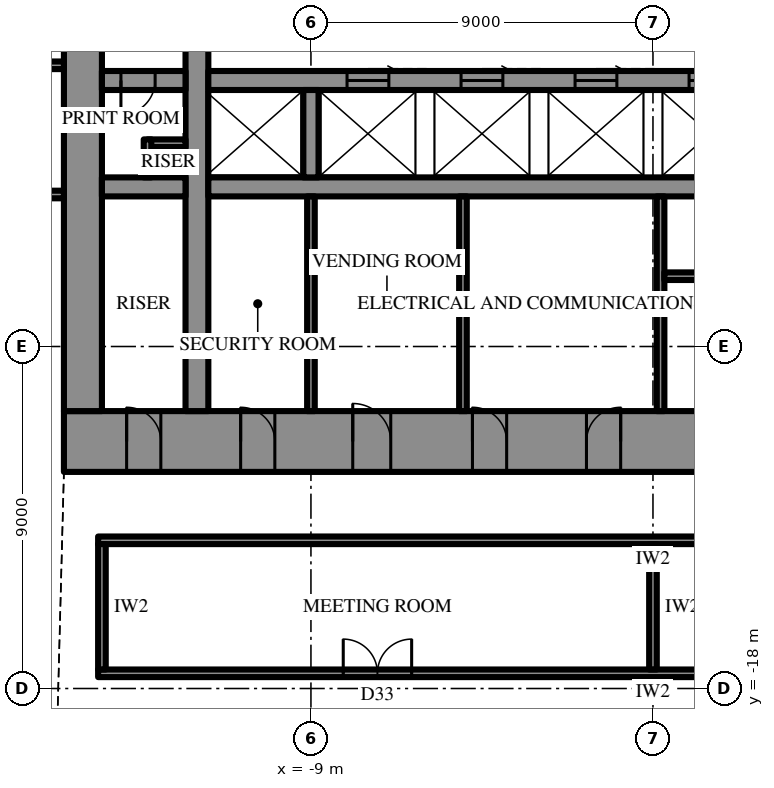
"""IFC4 building model, lengths in metres.
Left out: names, types, materials, properties, quantities, classifications, styles, units other than length and angle.
Written with IfcOpenShell. Run it as: python <this file> out.ifc"""

import sys

from ifc_helpers import new_model, si_unit, direction, frame, frame_2d, origin, place, context, subcontext, project, spatial, rectangle, extrude, element, fill, save


model = new_model("IFC4")
c1 = context("Model", 3, precision=1e-05, world=origin(), true_north=direction((0.0, 1.0)))
c2 = subcontext(c1, "Body", "Model", "MODEL_VIEW")
j1 = project(units=[si_unit("LENGTHUNIT", "METRE"), si_unit("PLANEANGLEUNIT", "RADIAN")], contexts=[c1])
p1 = place(None, origin())
s1 = spatial("IfcSite", under=j1, at=p1, CompositionType="ELEMENT")
p2 = place(p1, origin())
s2 = spatial("IfcBuilding", under=s1, at=p2, CompositionType="ELEMENT")
p3 = place(p2, frame((0.0, 0.0, 282.7)))
s3 = spatial("IfcBuildingStorey", under=s2, at=p3, CompositionType="ELEMENT", Elevation=282.7)
p4 = place(p3, frame((15.5, -11.5, 0.0), z_axis=(0.0, 0.0, 1.0), x_axis=(-1.0, 0.0, 0.0)))
e1 = element("IfcWall", 1, at=p4, inside=s3, PredefinedType="SHEAR", context=c2, shape_type="SweptSolid", body=[
    extrude(rectangle(XDim=31.0, YDim=1.6, at=frame_2d((15.5, 0.0))), origin(), (0.0, 0.0, 1.0), 4.2),
])
p5 = place(p4, frame((16.35, 0.0, 0.0)))
e2 = element("IfcOpeningElement", 2, at=p5, cuts=e1, PredefinedType="OPENING", context=c2, shape_type="SweptSolid", body=[
    extrude(rectangle(XDim=0.9, YDim=2.2, at=frame_2d((0.45, 1.1))), frame((0.0, 0.81, 0.0), z_axis=(0.0, -1.0, 0.0), x_axis=(1.0, 0.0, 0.0)), (0.0, 0.0, 1.0), 1.62),
])
p6 = place(p4, frame((19.35, 0.0, 0.0)))
e3 = element("IfcOpeningElement", 3, at=p6, cuts=e1, PredefinedType="OPENING", context=c2, shape_type="SweptSolid", body=[
    extrude(rectangle(XDim=0.9, YDim=2.2, at=frame_2d((0.45, 1.1))), frame((0.0, 0.81, 0.0), z_axis=(0.0, -1.0, 0.0), x_axis=(1.0, 0.0, 0.0)), (0.0, 0.0, 1.0), 1.62),
])
p7 = place(p4, frame((22.4, 0.0, 0.0)))
e4 = element("IfcOpeningElement", 4, at=p7, cuts=e1, PredefinedType="OPENING", context=c2, shape_type="SweptSolid", body=[
    extrude(rectangle(XDim=1.0, YDim=2.2, at=frame_2d((0.5, 1.1))), frame((0.0, 0.81, 0.0), z_axis=(0.0, -1.0, 0.0), x_axis=(1.0, 0.0, 0.0)), (0.0, 0.0, 1.0), 1.62),
])
p8 = place(p4, frame((1.65, 0.0, 0.0)))
e5 = element("IfcOpeningElement", 5, at=p8, cuts=e1, PredefinedType="OPENING", context=c2, shape_type="SweptSolid", body=[
    extrude(rectangle(XDim=0.9, YDim=2.2, at=frame_2d((0.45, 1.1))), frame((0.0, 0.81, 0.0), z_axis=(0.0, -1.0, 0.0), x_axis=(1.0, 0.0, 0.0)), (0.0, 0.0, 1.0), 1.62),
])
p9 = place(p4, frame((4.65, 0.0, 0.0)))
e6 = element("IfcOpeningElement", 6, at=p9, cuts=e1, PredefinedType="OPENING", context=c2, shape_type="SweptSolid", body=[
    extrude(rectangle(XDim=0.9, YDim=2.2, at=frame_2d((0.45, 1.1))), frame((0.0, 0.81, 0.0), z_axis=(0.0, -1.0, 0.0), x_axis=(1.0, 0.0, 0.0)), (0.0, 0.0, 1.0), 1.62),
])
p10 = place(p4, frame((25.45, 0.0, 0.0)))
e7 = element("IfcOpeningElement", 7, at=p10, cuts=e1, PredefinedType="OPENING", context=c2, shape_type="SweptSolid", body=[
    extrude(rectangle(XDim=0.9, YDim=2.2, at=frame_2d((0.45, 1.1))), frame((0.0, 0.81, 0.0), z_axis=(0.0, -1.0, 0.0), x_axis=(1.0, 0.0, 0.0)), (0.0, 0.0, 1.0), 1.62),
])
p11 = place(p4, frame((28.45, 0.0, 0.0)))
e8 = element("IfcOpeningElement", 8, at=p11, cuts=e1, PredefinedType="OPENING", context=c2, shape_type="SweptSolid", body=[
    extrude(rectangle(XDim=0.9, YDim=2.2, at=frame_2d((0.45, 1.1))), frame((0.0, 0.81, 0.0), z_axis=(0.0, -1.0, 0.0), x_axis=(1.0, 0.0, 0.0)), (0.0, 0.0, 1.0), 1.62),
])
p12 = place(p3, frame((-15.0, 10.7, 0.0), z_axis=(0.0, 0.0, 1.0), x_axis=(0.0, -1.0, 0.0)))
e9 = element("IfcWall", 9, at=p12, inside=s3, PredefinedType="SHEAR", context=c2, shape_type="SweptSolid", body=[
    extrude(rectangle(XDim=21.4, YDim=1.0, at=frame_2d((10.7, 0.0))), origin(), (0.0, 0.0, 1.0), 4.2),
])
p13 = place(p12, frame((9.8, 0.0, 0.0)))
e10 = element("IfcOpeningElement", 10, at=p13, cuts=e9, PredefinedType="OPENING", context=c2, shape_type="SweptSolid", body=[
    extrude(rectangle(XDim=1.8, YDim=2.4, at=frame_2d((0.9, 1.2))), frame((0.0, 0.51, 0.0), z_axis=(0.0, -1.0, 0.0), x_axis=(1.0, 0.0, 0.0)), (0.0, 0.0, 1.0), 1.02),
])
p14 = place(p3, frame((-12.0, -10.7, 0.0), z_axis=(0.0, 0.0, 1.0), x_axis=(0.0, 1.0, 0.0)))
e11 = element("IfcWall", 11, at=p14, inside=s3, PredefinedType="SHEAR", context=c2, shape_type="SweptSolid", body=[
    extrude(rectangle(XDim=21.4, YDim=0.6, at=frame_2d((10.7, 0.0))), origin(), (0.0, 0.0, 1.0), 4.2),
])
p15 = place(p14, frame((9.8, 0.0, 0.0)))
e12 = element("IfcOpeningElement", 12, at=p15, cuts=e11, PredefinedType="OPENING", context=c2, shape_type="SweptSolid", body=[
    extrude(rectangle(XDim=1.8, YDim=2.4, at=frame_2d((0.9, 1.2))), frame((0.0, 0.31, 0.0), z_axis=(0.0, -1.0, 0.0), x_axis=(1.0, 0.0, 0.0)), (0.0, 0.0, 1.0), 0.62),
])
p16 = place(p3, frame((3.2, -2.0, 0.0), z_axis=(0.0, 0.0, 1.0), x_axis=(-1.0, 0.0, 0.0)))
e13 = element("IfcWall", 13, at=p16, inside=s3, PredefinedType="SHEAR", context=c2, shape_type="SweptSolid", body=[
    extrude(rectangle(XDim=14.9, YDim=0.5, at=frame_2d((7.45, 0.0))), origin(), (0.0, 0.0, 1.0), 4.2),
])
p17 = place(p16, frame((1.15, 0.0, 0.0)))
e14 = element("IfcOpeningElement", 14, at=p17, cuts=e13, PredefinedType="OPENING", context=c2, shape_type="SweptSolid", body=[
    extrude(rectangle(XDim=1.1, YDim=2.2, at=frame_2d((0.55, 1.1))), frame((0.0, 0.26, 0.0), z_axis=(0.0, -1.0, 0.0), x_axis=(1.0, 0.0, 0.0)), (0.0, 0.0, 1.0), 0.52),
])
p18 = place(p16, frame((4.15, 0.0, 0.0)))
e15 = element("IfcOpeningElement", 15, at=p18, cuts=e13, PredefinedType="OPENING", context=c2, shape_type="SweptSolid", body=[
    extrude(rectangle(XDim=1.1, YDim=2.2, at=frame_2d((0.55, 1.1))), frame((0.0, 0.26, 0.0), z_axis=(0.0, -1.0, 0.0), x_axis=(1.0, 0.0, 0.0)), (0.0, 0.0, 1.0), 0.52),
])
p19 = place(p16, frame((7.15, 0.0, 0.0)))
e16 = element("IfcOpeningElement", 16, at=p19, cuts=e13, PredefinedType="OPENING", context=c2, shape_type="SweptSolid", body=[
    extrude(rectangle(XDim=1.1, YDim=2.2, at=frame_2d((0.55, 1.1))), frame((0.0, 0.26, 0.0), z_axis=(0.0, -1.0, 0.0), x_axis=(1.0, 0.0, 0.0)), (0.0, 0.0, 1.0), 0.52),
])
p20 = place(p16, frame((10.15, 0.0, 0.0)))
e17 = element("IfcOpeningElement", 17, at=p20, cuts=e13, PredefinedType="OPENING", context=c2, shape_type="SweptSolid", body=[
    extrude(rectangle(XDim=1.1, YDim=2.2, at=frame_2d((0.55, 1.1))), frame((0.0, 0.26, 0.0), z_axis=(0.0, -1.0, 0.0), x_axis=(1.0, 0.0, 0.0)), (0.0, 0.0, 1.0), 0.52),
])
p21 = place(p3, frame((-12.3, -2.0, 0.0), z_axis=(0.0, 0.0, 1.0), x_axis=(-1.0, 0.0, 0.0)))
e18 = element("IfcWall", 18, at=p21, inside=s3, PredefinedType="SHEAR", context=c2, shape_type="SweptSolid", body=[
    extrude(rectangle(XDim=2.2, YDim=0.5, at=frame_2d((1.1, 0.0))), origin(), (0.0, 0.0, 1.0), 4.2),
])
p22 = place(p21, frame((0.8, 0.0, 0.0)))
e19 = element("IfcOpeningElement", 19, at=p22, cuts=e18, PredefinedType="OPENING", context=c2, shape_type="SweptSolid", body=[
    extrude(rectangle(XDim=0.9, YDim=2.2, at=frame_2d((0.45, 1.1))), frame((0.0, 0.26, 0.0), z_axis=(0.0, -1.0, 0.0), x_axis=(1.0, 0.0, 0.0)), (0.0, 0.0, 1.0), 0.52),
])
p23 = place(p3, frame((11.7, -4.8, 0.0), z_axis=(0.0, 0.0, 1.0), x_axis=(-1.0, 0.0, 0.0)))
e20 = element("IfcWall", 20, at=p23, inside=s3, PredefinedType="SHEAR", context=c2, shape_type="SweptSolid", body=[
    extrude(rectangle(XDim=23.4, YDim=0.5, at=frame_2d((11.7, 0.0))), origin(), (0.0, 0.0, 1.0), 4.2),
])
p24 = place(p23, frame((6.6, 0.0, 0.0)))
e21 = element("IfcOpeningElement", 21, at=p24, cuts=e20, PredefinedType="OPENING", context=c2, shape_type="SweptSolid", body=[
    extrude(rectangle(XDim=1.2, YDim=2.2, at=frame_2d((0.6, 1.1))), frame((0.0, 0.26, 0.0), z_axis=(0.0, -1.0, 0.0), x_axis=(1.0, 0.0, 0.0)), (0.0, 0.0, 1.0), 0.52),
])
p25 = place(p23, frame((3.6, 0.0, 0.0)))
e22 = element("IfcOpeningElement", 22, at=p25, cuts=e20, PredefinedType="OPENING", context=c2, shape_type="SweptSolid", body=[
    extrude(rectangle(XDim=1.2, YDim=2.2, at=frame_2d((0.6, 1.1))), frame((0.0, 0.26, 0.0), z_axis=(0.0, -1.0, 0.0), x_axis=(1.0, 0.0, 0.0)), (0.0, 0.0, 1.0), 0.52),
])
p26 = place(p3, frame((-12.3, -4.8, 0.0), z_axis=(0.0, 0.0, 1.0), x_axis=(-1.0, 0.0, 0.0)))
e23 = element("IfcWall", 23, at=p26, inside=s3, PredefinedType="SHEAR", context=c2, shape_type="SweptSolid", body=[
    extrude(rectangle(XDim=2.2, YDim=0.5, at=frame_2d((1.1, 0.0))), origin(), (0.0, 0.0, 1.0), 4.2),
])
p27 = place(p3, frame((-9.0, -2.25, 0.0), z_axis=(0.0, 0.0, 1.0), x_axis=(0.0, -1.0, 0.0)))
e24 = element("IfcWall", 24, at=p27, inside=s3, PredefinedType="SHEAR", context=c2, shape_type="SweptSolid", body=[
    extrude(rectangle(XDim=2.3, YDim=0.4, at=frame_2d((1.15, 0.0))), origin(), (0.0, 0.0, 1.0), 4.2),
])
p28 = place(p3, frame((0.2, -5.05, 0.0), z_axis=(0.0, 0.0, 1.0), x_axis=(0.0, -1.0, 0.0)))
e25 = element("IfcWall", 25, at=p28, inside=s3, PredefinedType="SHEAR", context=c2, shape_type="SweptSolid", body=[
    extrude(rectangle(XDim=5.65, YDim=0.2, at=frame_2d((2.825, 0.0))), origin(), (0.0, 0.0, 1.0), 4.2),
])
p29 = place(p3, frame((8.9, -7.15, 0.0), z_axis=(0.0, 0.0, 1.0), x_axis=(-1.0, 0.0, 0.0)))
e26 = element("IfcWall", 26, at=p29, inside=s3, PredefinedType="SHEAR", context=c2, shape_type="SweptSolid", body=[
    extrude(rectangle(XDim=8.6, YDim=0.2, at=frame_2d((4.3, 0.0))), origin(), (0.0, 0.0, 1.0), 4.2),
])
p30 = place(p29, frame((0.3, 0.0, 0.0)))
e27 = element("IfcOpeningElement", 27, at=p30, cuts=e26, PredefinedType="OPENING", context=c2, shape_type="SweptSolid", body=[
    extrude(rectangle(XDim=1.0, YDim=2.2, at=frame_2d((0.5, 1.1))), frame((0.0, 0.11, 0.0), z_axis=(0.0, -1.0, 0.0), x_axis=(1.0, 0.0, 0.0)), (0.0, 0.0, 1.0), 0.22),
])
for number, where, z_axis, x_axis in (
    (28, (-9.0, -5.05, 0.0), (0.0, 0.0, 1.0), (0.0, -1.0, 0.0)),
    (29, (-5.0, -5.05, 0.0), (0.0, 0.0, 1.0), (0.0, -1.0, 0.0)),
):
    element("IfcWall", number, at=place(p3, frame(where, z_axis=z_axis, x_axis=x_axis)), inside=s3, PredefinedType="PARTITIONING", context=c2, shape_type="SweptSolid", body=[
        extrude(rectangle(XDim=5.65, YDim=0.2, at=frame_2d((2.825, 0.0))), origin(), (0.0, 0.0, 1.0), 4.0),
    ])
for number, where, z_axis, x_axis in (
    (30, (-12.3, -3.65, 0.0), (0.0, 0.0, 1.0), (-1.0, 0.0, 0.0)),
    (31, (-13.3, -3.55, 0.0), (0.0, 0.0, 1.0), (0.0, -1.0, 0.0)),
):
    element("IfcWall", number, at=place(p3, frame(where, z_axis=z_axis, x_axis=x_axis)), inside=s3, PredefinedType="PARTITIONING", context=c2, shape_type="SweptSolid", body=[
        extrude(rectangle(XDim=1.0, YDim=0.2, at=frame_2d((0.5, 0.0))), origin(), (0.0, 0.0, 1.0), 4.0),
    ])
p31 = place(p3, frame((14.6, -14.1, 0.0), z_axis=(0.0, 0.0, 1.0), x_axis=(-1.0, 0.0, 0.0)))
e32 = element("IfcWall", 32, at=p31, inside=s3, PredefinedType="PARTITIONING", context=c2, shape_type="SweptSolid", body=[
    extrude(rectangle(XDim=29.2, YDim=0.2, at=frame_2d((14.6, 0.0))), origin(), (0.0, 0.0, 1.0), 4.0),
])
p32 = place(p3, frame((14.6, -17.6, 0.0), z_axis=(0.0, 0.0, 1.0), x_axis=(-1.0, 0.0, 0.0)))
e33 = element("IfcWall", 33, at=p32, inside=s3, PredefinedType="PARTITIONING", context=c2, shape_type="SweptSolid", body=[
    extrude(rectangle(XDim=29.2, YDim=0.2, at=frame_2d((14.6, 0.0))), origin(), (0.0, 0.0, 1.0), 4.0),
])
p33 = place(p32, frame((6.45, 0.0, 0.0)))
e34 = element("IfcOpeningElement", 34, at=p33, cuts=e33, PredefinedType="OPENING", context=c2, shape_type="SweptSolid", body=[
    extrude(rectangle(XDim=1.8, YDim=2.4, at=frame_2d((0.9, 1.2))), frame((0.0, 0.11, 0.0), z_axis=(0.0, -1.0, 0.0), x_axis=(1.0, 0.0, 0.0)), (0.0, 0.0, 1.0), 0.22),
])
p34 = place(p32, frame((20.95, 0.0, 0.0)))
e35 = element("IfcOpeningElement", 35, at=p34, cuts=e33, PredefinedType="OPENING", context=c2, shape_type="SweptSolid", body=[
    extrude(rectangle(XDim=1.8, YDim=2.4, at=frame_2d((0.9, 1.2))), frame((0.0, 0.11, 0.0), z_axis=(0.0, -1.0, 0.0), x_axis=(1.0, 0.0, 0.0)), (0.0, 0.0, 1.0), 0.22),
])
p35 = place(p3, frame((0.0, -14.2, 0.0), z_axis=(0.0, 0.0, 1.0), x_axis=(0.0, -1.0, 0.0)))
e36 = element("IfcWall", 36, at=p35, inside=s3, PredefinedType="PARTITIONING", context=c2, shape_type="SweptSolid", body=[
    extrude(rectangle(XDim=3.3, YDim=0.2, at=frame_2d((1.65, 0.0))), origin(), (0.0, 0.0, 1.0), 2.992),
])
p36 = place(p3, frame((-14.5, -14.2, 0.0), z_axis=(0.0, 0.0, 1.0), x_axis=(0.0, -1.0, 0.0)))
e37 = element("IfcWall", 37, at=p36, inside=s3, PredefinedType="PARTITIONING", context=c2, shape_type="SweptSolid", body=[
    extrude(rectangle(XDim=3.3, YDim=0.2, at=frame_2d((1.65, 0.0))), origin(), (0.0, 0.0, 1.0), 4.0),
])
p37 = place(p3, frame((-15.5, -1.6, 0.0), z_axis=(0.0, 0.0, 1.0), x_axis=(-1.0, 0.0, 0.0)))
e38 = element("IfcWall", 38, at=p37, inside=s3, PredefinedType="PARTITIONING", context=c2, shape_type="SweptSolid", body=[
    extrude(rectangle(XDim=9.7, YDim=0.2, at=frame_2d((4.85, 0.0))), origin(), (0.0, 0.0, 1.0), 4.0),
])
p38 = place(p37, frame((4.35, 0.0, 0.0)))
e39 = element("IfcOpeningElement", 39, at=p38, cuts=e38, PredefinedType="OPENING", context=c2, shape_type="SweptSolid", body=[
    extrude(rectangle(XDim=1.0, YDim=2.2, at=frame_2d((0.5, 1.1))), frame((0.0, 0.11, 0.0), z_axis=(0.0, -1.0, 0.0), x_axis=(1.0, 0.0, 0.0)), (0.0, 0.0, 1.0), 0.22),
])
p39 = place(p3, frame((-15.5, -5.0, 0.0), z_axis=(0.0, 0.0, 1.0), x_axis=(-1.0, 0.0, 0.0)))
e40 = element("IfcWall", 40, at=p39, inside=s3, PredefinedType="PARTITIONING", context=c2, shape_type="SweptSolid", body=[
    extrude(rectangle(XDim=14.845, YDim=0.2, at=frame_2d((7.423, 0.0))), origin(), (0.0, 0.0, 1.0), 4.0),
])
p40 = place(p39, frame((0.985, 0.0, 0.0)))
e41 = element("IfcOpeningElement", 41, at=p40, cuts=e40, PredefinedType="OPENING", context=c2, shape_type="SweptSolid", body=[
    extrude(rectangle(XDim=1.0, YDim=2.2, at=frame_2d((0.5, 1.1))), frame((0.0, 0.11, 0.0), z_axis=(0.0, -1.0, 0.0), x_axis=(1.0, 0.0, 0.0)), (0.0, 0.0, 1.0), 0.22),
])
p41 = place(p5, frame((0.9, 0.0, 0.0), z_axis=(0.0, 0.0, 1.0), x_axis=(-1.0, 0.0, 0.0)))
e42 = element("IfcDoor", 42, at=p41, inside=s3, OperationType="SINGLE_SWING_LEFT", PredefinedType="DOOR", context=c2, shape_type="SweptSolid", body=[
    extrude(rectangle(XDim=0.9, YDim=2.2, at=frame_2d((0.45, 1.1))), frame((0.0, 0.025, 0.0), z_axis=(0.0, -1.0, 0.0), x_axis=(1.0, 0.0, 0.0)), (0.0, 0.0, 1.0), 0.05),
])
fill(e2, e42)
p42 = place(p6, frame((0.9, 0.0, 0.0), z_axis=(0.0, 0.0, 1.0), x_axis=(-1.0, 0.0, 0.0)))
e43 = element("IfcDoor", 43, at=p42, inside=s3, OperationType="SINGLE_SWING_RIGHT", PredefinedType="DOOR", context=c2, shape_type="SweptSolid", body=[
    extrude(rectangle(XDim=0.9, YDim=2.2, at=frame_2d((0.45, 1.1))), frame((0.0, 0.025, 0.0), z_axis=(0.0, -1.0, 0.0), x_axis=(1.0, 0.0, 0.0)), (0.0, 0.0, 1.0), 0.05),
])
fill(e3, e43)
p43 = place(p7, frame((1.0, 0.0, 0.0), z_axis=(0.0, 0.0, 1.0), x_axis=(-1.0, 0.0, 0.0)))
e44 = element("IfcDoor", 44, at=p43, inside=s3, OperationType="SINGLE_SWING_RIGHT", PredefinedType="DOOR", context=c2, shape_type="SweptSolid", body=[
    extrude(rectangle(XDim=1.0, YDim=2.2, at=frame_2d((0.5, 1.1))), frame((0.0, 0.025, 0.0), z_axis=(0.0, -1.0, 0.0), x_axis=(1.0, 0.0, 0.0)), (0.0, 0.0, 1.0), 0.05),
])
fill(e4, e44)
p44 = place(p10, frame((0.9, 0.0, 0.0), z_axis=(0.0, 0.0, 1.0), x_axis=(-1.0, 0.0, 0.0)))
e45 = element("IfcDoor", 45, at=p44, inside=s3, OperationType="SINGLE_SWING_RIGHT", PredefinedType="DOOR", context=c2, shape_type="SweptSolid", body=[
    extrude(rectangle(XDim=0.9, YDim=2.2, at=frame_2d((0.45, 1.1))), frame((0.0, 0.025, 0.0), z_axis=(0.0, -1.0, 0.0), x_axis=(1.0, 0.0, 0.0)), (0.0, 0.0, 1.0), 0.05),
])
fill(e7, e45)
p45 = place(p11, frame((0.9, 0.0, 0.0), z_axis=(0.0, 0.0, 1.0), x_axis=(-1.0, 0.0, 0.0)))
e46 = element("IfcDoor", 46, at=p45, inside=s3, OperationType="SINGLE_SWING_RIGHT", PredefinedType="DOOR", context=c2, shape_type="SweptSolid", body=[
    extrude(rectangle(XDim=0.9, YDim=2.2, at=frame_2d((0.45, 1.1))), frame((0.0, 0.025, 0.0), z_axis=(0.0, -1.0, 0.0), x_axis=(1.0, 0.0, 0.0)), (0.0, 0.0, 1.0), 0.05),
])
fill(e8, e46)
p46 = place(p22, origin())
e47 = element("IfcDoor", 47, at=p46, inside=s3, OperationType="SINGLE_SWING_LEFT", PredefinedType="DOOR", context=c2, shape_type="SweptSolid", body=[
    extrude(rectangle(XDim=0.9, YDim=2.2, at=frame_2d((0.45, 1.1))), frame((0.0, 0.025, 0.0), z_axis=(0.0, -1.0, 0.0), x_axis=(1.0, 0.0, 0.0)), (0.0, 0.0, 1.0), 0.05),
])
fill(e19, e47)
p47 = place(p17, frame((1.1, 0.0, 0.0), z_axis=(0.0, 0.0, 1.0), x_axis=(-1.0, 0.0, 0.0)))
e48 = element("IfcDoor", 48, at=p47, inside=s3, OperationType="SLIDING_TO_LEFT", PredefinedType="DOOR", context=c2, shape_type="SweptSolid", body=[
    extrude(rectangle(XDim=1.1, YDim=2.2, at=frame_2d((0.55, 1.1))), frame((0.0, 0.025, 0.0), z_axis=(0.0, -1.0, 0.0), x_axis=(1.0, 0.0, 0.0)), (0.0, 0.0, 1.0), 0.05),
])
fill(e14, e48)
p48 = place(p18, frame((1.1, 0.0, 0.0), z_axis=(0.0, 0.0, 1.0), x_axis=(-1.0, 0.0, 0.0)))
e49 = element("IfcDoor", 49, at=p48, inside=s3, OperationType="SLIDING_TO_LEFT", PredefinedType="DOOR", context=c2, shape_type="SweptSolid", body=[
    extrude(rectangle(XDim=1.1, YDim=2.2, at=frame_2d((0.55, 1.1))), frame((0.0, 0.025, 0.0), z_axis=(0.0, -1.0, 0.0), x_axis=(1.0, 0.0, 0.0)), (0.0, 0.0, 1.0), 0.05),
])
fill(e15, e49)
p49 = place(p19, frame((1.1, 0.0, 0.0), z_axis=(0.0, 0.0, 1.0), x_axis=(-1.0, 0.0, 0.0)))
e50 = element("IfcDoor", 50, at=p49, inside=s3, OperationType="SLIDING_TO_LEFT", PredefinedType="DOOR", context=c2, shape_type="SweptSolid", body=[
    extrude(rectangle(XDim=1.1, YDim=2.2, at=frame_2d((0.55, 1.1))), frame((0.0, 0.025, 0.0), z_axis=(0.0, -1.0, 0.0), x_axis=(1.0, 0.0, 0.0)), (0.0, 0.0, 1.0), 0.05),
])
fill(e16, e50)
p50 = place(p20, frame((1.1, 0.0, 0.0), z_axis=(0.0, 0.0, 1.0), x_axis=(-1.0, 0.0, 0.0)))
e51 = element("IfcDoor", 51, at=p50, inside=s3, OperationType="SLIDING_TO_LEFT", PredefinedType="DOOR", context=c2, shape_type="SweptSolid", body=[
    extrude(rectangle(XDim=1.1, YDim=2.2, at=frame_2d((0.55, 1.1))), frame((0.0, 0.025, 0.0), z_axis=(0.0, -1.0, 0.0), x_axis=(1.0, 0.0, 0.0)), (0.0, 0.0, 1.0), 0.05),
])
fill(e17, e51)
p51 = place(p34, frame((1.8, 0.0, 0.0), z_axis=(0.0, 0.0, 1.0), x_axis=(-1.0, 0.0, 0.0)))
e52 = element("IfcDoor", 52, at=p51, inside=s3, OperationType="DOUBLE_DOOR_SINGLE_SWING", PredefinedType="DOOR", context=c2, shape_type="SweptSolid", body=[
    extrude(rectangle(XDim=1.8, YDim=2.4, at=frame_2d((0.9, 1.2))), frame((0.0, 0.025, 0.0), z_axis=(0.0, -1.0, 0.0), x_axis=(1.0, 0.0, 0.0)), (0.0, 0.0, 1.0), 0.05),
])
fill(e35, e52)
save(model, sys.argv[1])
